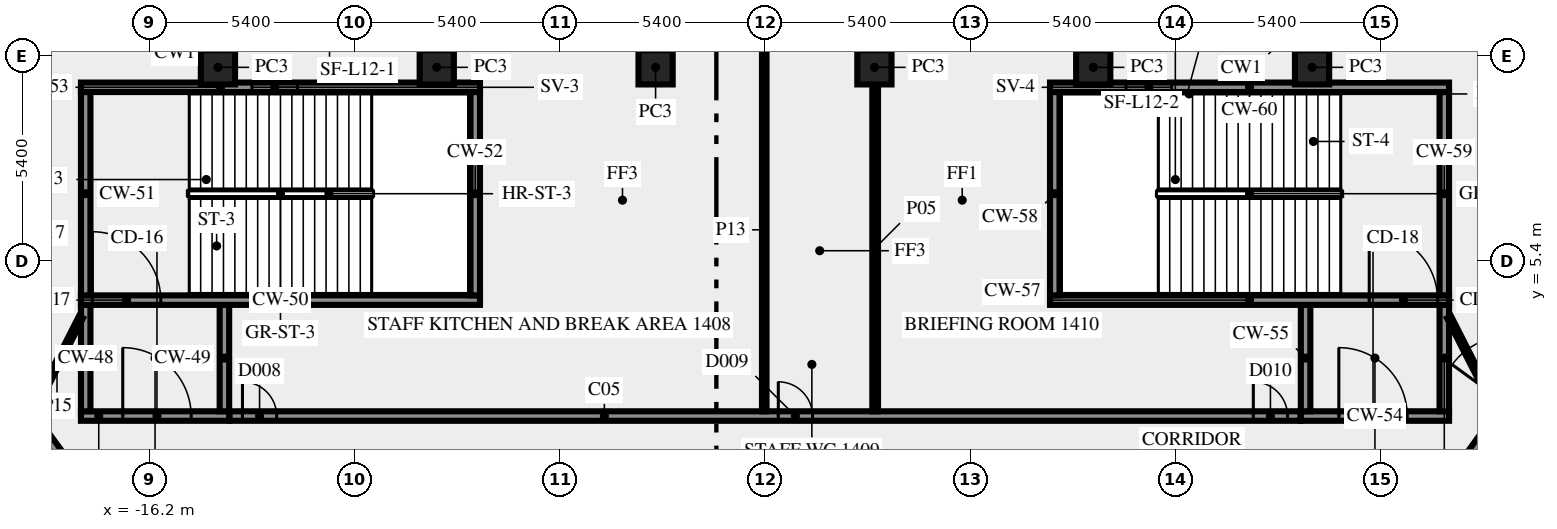
"""IFC4 building model, lengths in metres.
Left out: names, types, materials, properties, quantities, classifications, styles, units other than length and angle.
Written with IfcOpenShell. Run it as: python <this file> out.ifc"""

import sys

from ifc_helpers import new_model, si_unit, direction, frame, frame_2d, origin, origin_2d, place, context, subcontext, project, spatial, rectangle, extrude, element, fill, save


model = new_model("IFC4")
c1 = context("Model", 3, precision=1e-05, world=origin(), true_north=direction((0.0, 1.0)))
c2 = subcontext(c1, "Body", "Model", "MODEL_VIEW")
j1 = project(units=[si_unit("LENGTHUNIT", "METRE"), si_unit("PLANEANGLEUNIT", "RADIAN")], contexts=[c1])
p1 = place(None, origin())
s1 = spatial("IfcSite", under=j1, at=p1, CompositionType="ELEMENT")
p2 = place(p1, origin())
s2 = spatial("IfcBuilding", under=s1, at=p2, CompositionType="ELEMENT")
p3 = place(p2, frame((0.0, 0.0, 63.0)))
s3 = spatial("IfcBuildingStorey", under=s2, at=p3, CompositionType="ELEMENT", Elevation=63.0)
for number, where, z_axis, x_axis in (
    (1, (14.395, 10.5, 0.0), (0.0, 0.0, 1.0), (-1.0, 0.0, 0.0)),
    (2, (8.637, 10.5, 0.0), (0.0, 0.0, 1.0), (-1.0, 0.0, 0.0)),
    (3, (2.879, 10.5, 0.0), (0.0, 0.0, 1.0), (-1.0, 0.0, 0.0)),
    (4, (-2.879, 10.5, 0.0), (0.0, 0.0, 1.0), (-1.0, 0.0, 0.0)),
    (5, (-8.637, 10.5, 0.0), (0.0, 0.0, 1.0), (-1.0, 0.0, 0.0)),
    (6, (-14.395, 10.5, 0.0), (0.0, 0.0, 1.0), (-1.0, 0.0, 0.0)),
):
    element("IfcColumn", number, at=place(p3, frame(where, z_axis=z_axis, x_axis=x_axis)), inside=s3, PredefinedType="COLUMN", context=c2, shape_type="SweptSolid", body=[
        extrude(rectangle(XDim=0.9, YDim=0.9, at=origin_2d()), origin(), (0.0, 0.0, 1.0), 3.65),
    ])
p4 = place(p3, frame((-18.0, 1.325, 0.0), z_axis=(0.0, 0.0, 1.0), x_axis=(1.0, 0.0, 0.0)))
e7 = element("IfcWall", 7, at=p4, inside=s3, PredefinedType="SHEAR", context=c2, shape_type="SweptSolid", body=[
    extrude(rectangle(XDim=3.9, YDim=0.25, at=frame_2d((1.95, 0.0))), origin(), (0.0, 0.0, 1.0), 3.65),
])
p5 = place(p4, frame((1.1, 0.0, 0.0)))
e8 = element("IfcOpeningElement", 8, at=p5, cuts=e7, PredefinedType="OPENING", context=c2, shape_type="SweptSolid", body=[
    extrude(rectangle(XDim=1.8, YDim=2.1, at=frame_2d((0.9, 1.05))), frame((0.0, 0.135, 0.0), z_axis=(0.0, -1.0, 0.0), x_axis=(1.0, 0.0, 0.0)), (0.0, 0.0, 1.0), 0.27),
])
for number, where, z_axis, x_axis in (
    (9, (-17.875, 1.45, 0.0), (0.0, 0.0, 1.0), (0.0, 1.0, 0.0)),
    (10, (-14.225, 1.45, 0.0), (0.0, 0.0, 1.0), (0.0, 1.0, 0.0)),
):
    element("IfcWall", number, at=place(p3, frame(where, z_axis=z_axis, x_axis=x_axis)), inside=s3, PredefinedType="SHEAR", context=c2, shape_type="SweptSolid", body=[
        extrude(rectangle(XDim=2.8, YDim=0.25, at=frame_2d((1.4, 0.0))), origin(), (0.0, 0.0, 1.0), 3.65),
    ])
p6 = place(p3, frame((-18.0, 4.375, 0.0), z_axis=(0.0, 0.0, 1.0), x_axis=(1.0, 0.0, 0.0)))
e11 = element("IfcWall", 11, at=p6, inside=s3, PredefinedType="SHEAR", context=c2, shape_type="SweptSolid", body=[
    extrude(rectangle(XDim=10.5, YDim=0.25, at=frame_2d((5.25, 0.0))), origin(), (0.0, 0.0, 1.0), 3.65),
])
p7 = place(p6, frame((0.3, 0.0, 0.0)))
e12 = element("IfcOpeningElement", 12, at=p7, cuts=e11, PredefinedType="OPENING", context=c2, shape_type="SweptSolid", body=[
    extrude(rectangle(XDim=1.8, YDim=2.1, at=frame_2d((0.9, 1.05))), frame((0.0, 0.135, 0.0), z_axis=(0.0, -1.0, 0.0), x_axis=(1.0, 0.0, 0.0)), (0.0, 0.0, 1.0), 0.27),
])
for number, where, z_axis, x_axis in (
    (13, (-17.875, 4.5, 0.0), (0.0, 0.0, 1.0), (0.0, 1.0, 0.0)),
    (14, (-7.625, 4.5, 0.0), (0.0, 0.0, 1.0), (0.0, 1.0, 0.0)),
):
    element("IfcWall", number, at=place(p3, frame(where, z_axis=z_axis, x_axis=x_axis)), inside=s3, PredefinedType="SHEAR", context=c2, shape_type="SweptSolid", body=[
        extrude(rectangle(XDim=5.35, YDim=0.25, at=frame_2d((2.675, 0.0))), origin(), (0.0, 0.0, 1.0), 3.65),
    ])
p8 = place(p3, frame((-18.0, 9.975, 0.0), z_axis=(0.0, 0.0, 1.0), x_axis=(1.0, 0.0, 0.0)))
e15 = element("IfcWall", 15, at=p8, inside=s3, PredefinedType="SHEAR", context=c2, shape_type="SweptSolid", body=[
    extrude(rectangle(XDim=10.5, YDim=0.25, at=frame_2d((5.25, 0.0))), origin(), (0.0, 0.0, 1.0), 3.65),
])
p9 = place(p8, frame((4.5, 0.0, 1.0)))
e16 = element("IfcOpeningElement", 16, at=p9, cuts=e15, PredefinedType="OPENING", context=c2, shape_type="SweptSolid", body=[
    extrude(rectangle(XDim=1.2, YDim=1.2, at=frame_2d((0.6, 0.6))), frame((0.0, 0.135, 0.0), z_axis=(0.0, -1.0, 0.0), x_axis=(1.0, 0.0, 0.0)), (0.0, 0.0, 1.0), 0.27),
])
p10 = place(p3, frame((14.1, 1.325, 0.0), z_axis=(0.0, 0.0, 1.0), x_axis=(1.0, 0.0, 0.0)))
e17 = element("IfcWall", 17, at=p10, inside=s3, PredefinedType="SHEAR", context=c2, shape_type="SweptSolid", body=[
    extrude(rectangle(XDim=3.9, YDim=0.25, at=frame_2d((1.95, 0.0))), origin(), (0.0, 0.0, 1.0), 3.65),
])
p11 = place(p10, frame((1.0, 0.0, 0.0)))
e18 = element("IfcOpeningElement", 18, at=p11, cuts=e17, PredefinedType="OPENING", context=c2, shape_type="SweptSolid", body=[
    extrude(rectangle(XDim=1.8, YDim=2.1, at=frame_2d((0.9, 1.05))), frame((0.0, 0.135, 0.0), z_axis=(0.0, -1.0, 0.0), x_axis=(1.0, 0.0, 0.0)), (0.0, 0.0, 1.0), 0.27),
])
for number, where, z_axis, x_axis in (
    (19, (14.225, 1.45, 0.0), (0.0, 0.0, 1.0), (0.0, 1.0, 0.0)),
    (20, (17.875, 1.45, 0.0), (0.0, 0.0, 1.0), (0.0, 1.0, 0.0)),
):
    element("IfcWall", number, at=place(p3, frame(where, z_axis=z_axis, x_axis=x_axis)), inside=s3, PredefinedType="SHEAR", context=c2, shape_type="SweptSolid", body=[
        extrude(rectangle(XDim=2.8, YDim=0.25, at=frame_2d((1.4, 0.0))), origin(), (0.0, 0.0, 1.0), 3.65),
    ])
p12 = place(p3, frame((7.5, 4.375, 0.0), z_axis=(0.0, 0.0, 1.0), x_axis=(1.0, 0.0, 0.0)))
e21 = element("IfcWall", 21, at=p12, inside=s3, PredefinedType="SHEAR", context=c2, shape_type="SweptSolid", body=[
    extrude(rectangle(XDim=10.5, YDim=0.25, at=frame_2d((5.25, 0.0))), origin(), (0.0, 0.0, 1.0), 3.65),
])
p13 = place(p12, frame((8.4, 0.0, 0.0)))
e22 = element("IfcOpeningElement", 22, at=p13, cuts=e21, PredefinedType="OPENING", context=c2, shape_type="SweptSolid", body=[
    extrude(rectangle(XDim=1.8, YDim=2.1, at=frame_2d((0.9, 1.05))), frame((0.0, 0.135, 0.0), z_axis=(0.0, -1.0, 0.0), x_axis=(1.0, 0.0, 0.0)), (0.0, 0.0, 1.0), 0.27),
])
for number, where, z_axis, x_axis in (
    (23, (7.625, 4.5, 0.0), (0.0, 0.0, 1.0), (0.0, 1.0, 0.0)),
    (24, (17.875, 4.5, 0.0), (0.0, 0.0, 1.0), (0.0, 1.0, 0.0)),
):
    element("IfcWall", number, at=place(p3, frame(where, z_axis=z_axis, x_axis=x_axis)), inside=s3, PredefinedType="SHEAR", context=c2, shape_type="SweptSolid", body=[
        extrude(rectangle(XDim=5.35, YDim=0.25, at=frame_2d((2.675, 0.0))), origin(), (0.0, 0.0, 1.0), 3.65),
    ])
p14 = place(p3, frame((7.5, 9.975, 0.0), z_axis=(0.0, 0.0, 1.0), x_axis=(1.0, 0.0, 0.0)))
e25 = element("IfcWall", 25, at=p14, inside=s3, PredefinedType="SHEAR", context=c2, shape_type="SweptSolid", body=[
    extrude(rectangle(XDim=10.5, YDim=0.25, at=frame_2d((5.25, 0.0))), origin(), (0.0, 0.0, 1.0), 3.65),
])
p15 = place(p14, frame((2.0, 0.0, 1.0)))
e26 = element("IfcOpeningElement", 26, at=p15, cuts=e25, PredefinedType="OPENING", context=c2, shape_type="SweptSolid", body=[
    extrude(rectangle(XDim=1.2, YDim=1.2, at=frame_2d((0.6, 0.6))), frame((0.0, 0.135, 0.0), z_axis=(0.0, -1.0, 0.0), x_axis=(1.0, 0.0, 0.0)), (0.0, 0.0, 1.0), 0.27),
])
p16 = place(p3, frame((-37.232, 25.972, 0.0), z_axis=(0.0, 0.0, 1.0), x_axis=(0.587786323093, -0.809016216391, 0.0)))
e27 = element("IfcWall", 27, at=p16, inside=s3, PredefinedType="SOLIDWALL", context=c2, shape_type="SweptSolid", body=[
    extrude(rectangle(XDim=33.493, YDim=0.25, at=frame_2d((16.747, 0.0))), origin(), (0.0, 0.0, 1.0), 3.65),
])
p17 = place(p16, frame((28.301, 0.0, 0.0)))
e28 = element("IfcOpeningElement", 28, at=p17, cuts=e27, PredefinedType="OPENING", context=c2, shape_type="SweptSolid", body=[
    extrude(rectangle(XDim=1.8, YDim=2.1, at=frame_2d((0.9, 1.05))), frame((0.0, 0.135, 0.0), z_axis=(0.0, -1.0, 0.0), x_axis=(1.0, 0.0, 0.0)), (0.0, 0.0, 1.0), 0.27),
])
p18 = place(p16, frame((4.235, 0.0, 0.0)))
e29 = element("IfcOpeningElement", 29, at=p18, cuts=e27, PredefinedType="OPENING", context=c2, shape_type="SweptSolid", body=[
    extrude(rectangle(XDim=1.8, YDim=2.1, at=frame_2d((0.9, 1.05))), frame((0.0, 0.135, 0.0), z_axis=(0.0, -1.0, 0.0), x_axis=(1.0, 0.0, 0.0)), (0.0, 0.0, 1.0), 0.27),
])
p19 = place(p16, frame((2.685, 0.0, 0.0)))
e30 = element("IfcOpeningElement", 30, at=p19, cuts=e27, PredefinedType="OPENING", context=c2, shape_type="SweptSolid", body=[
    extrude(rectangle(XDim=0.9, YDim=2.1, at=frame_2d((0.45, 1.05))), frame((0.0, 0.135, 0.0), z_axis=(0.0, -1.0, 0.0), x_axis=(1.0, 0.0, 0.0)), (0.0, 0.0, 1.0), 0.27),
])
p20 = place(p3, frame((-14.09, 1.325, 0.0), z_axis=(0.0, 0.0, 1.0), x_axis=(1.0, 0.0, 0.0)))
e31 = element("IfcWall", 31, at=p20, inside=s3, PredefinedType="SOLIDWALL", context=c2, shape_type="SweptSolid", body=[
    extrude(rectangle(XDim=28.18, YDim=0.25, at=frame_2d((14.09, 0.0))), origin(), (0.0, 0.0, 1.0), 3.65),
])
p21 = place(p20, frame((26.94, 0.0, 0.0)))
e32 = element("IfcOpeningElement", 32, at=p21, cuts=e31, PredefinedType="OPENING", context=c2, shape_type="SweptSolid", body=[
    extrude(rectangle(XDim=0.9, YDim=2.1, at=frame_2d((0.45, 1.05))), frame((0.0, 0.135, 0.0), z_axis=(0.0, -1.0, 0.0), x_axis=(1.0, 0.0, 0.0)), (0.0, 0.0, 1.0), 0.27),
])
p22 = place(p20, frame((0.34, 0.0, 0.0)))
e33 = element("IfcOpeningElement", 33, at=p22, cuts=e31, PredefinedType="OPENING", context=c2, shape_type="SweptSolid", body=[
    extrude(rectangle(XDim=0.9, YDim=2.1, at=frame_2d((0.45, 1.05))), frame((0.0, 0.135, 0.0), z_axis=(0.0, -1.0, 0.0), x_axis=(1.0, 0.0, 0.0)), (0.0, 0.0, 1.0), 0.27),
])
p23 = place(p20, frame((14.44, 0.0, 0.0)))
e34 = element("IfcOpeningElement", 34, at=p23, cuts=e31, PredefinedType="OPENING", context=c2, shape_type="SweptSolid", body=[
    extrude(rectangle(XDim=0.9, YDim=2.1, at=frame_2d((0.45, 1.05))), frame((0.0, 0.135, 0.0), z_axis=(0.0, -1.0, 0.0), x_axis=(1.0, 0.0, 0.0)), (0.0, 0.0, 1.0), 0.27),
])
p24 = place(p3, frame((17.545, -1.125, 0.0), z_axis=(0.0, 0.0, 1.0), x_axis=(0.587786323093, 0.809016216391, 0.0)))
e35 = element("IfcWall", 35, at=p24, inside=s3, PredefinedType="SOLIDWALL", context=c2, shape_type="SweptSolid", body=[
    extrude(rectangle(XDim=33.493, YDim=0.25, at=frame_2d((16.747, 0.0))), origin(), (0.0, 0.0, 1.0), 3.65),
])
p25 = place(p24, frame((31.403, 0.0, 0.0)))
e36 = element("IfcOpeningElement", 36, at=p25, cuts=e35, PredefinedType="OPENING", context=c2, shape_type="SweptSolid", body=[
    extrude(rectangle(XDim=1.8, YDim=2.1, at=frame_2d((0.9, 1.05))), frame((0.0, 0.135, 0.0), z_axis=(0.0, -1.0, 0.0), x_axis=(1.0, 0.0, 0.0)), (0.0, 0.0, 1.0), 0.27),
])
p26 = place(p24, frame((3.392, 0.0, 0.0)))
e37 = element("IfcOpeningElement", 37, at=p26, cuts=e35, PredefinedType="OPENING", context=c2, shape_type="SweptSolid", body=[
    extrude(rectangle(XDim=1.8, YDim=2.1, at=frame_2d((0.9, 1.05))), frame((0.0, 0.135, 0.0), z_axis=(0.0, -1.0, 0.0), x_axis=(1.0, 0.0, 0.0)), (0.0, 0.0, 1.0), 0.27),
])
p27 = place(p3, frame((2.899, 10.045, 0.0), z_axis=(0.0, 0.0, 1.0), x_axis=(0.0, -1.0, 0.0)))
e38 = element("IfcWall", 38, at=p27, inside=s3, PredefinedType="PARTITIONING", context=c2, shape_type="SweptSolid", body=[
    extrude(rectangle(XDim=8.595, YDim=0.15, at=frame_2d((4.297, 0.0))), origin(), (0.0, 0.0, 1.0), 3.65),
])
p28 = place(p3, frame((-0.02, 1.45, 0.0), z_axis=(0.0, 0.0, 1.0), x_axis=(0.0, 1.0, 0.0)))
e39 = element("IfcWall", 39, at=p28, inside=s3, PredefinedType="PARTITIONING", context=c2, shape_type="SweptSolid", body=[
    extrude(rectangle(XDim=9.55, YDim=0.12, at=frame_2d((4.775, 0.0))), origin(), (0.0, 0.0, 1.0), 2.75),
])
for number, where, z_axis, x_axis in (
    (40, (18.0, 3.925, 0.0), (0.0, 0.0, 1.0), (0.454, -0.891, 0.0)),
    (41, (-19.261, 1.45, 0.0), (0.0, 0.0, 1.0), (0.454, 0.891, 0.0)),
):
    element("IfcWall", number, at=place(p3, frame(where, z_axis=z_axis, x_axis=x_axis)), inside=s3, PredefinedType="PARTITIONING", context=c2, shape_type="SweptSolid", body=[
        extrude(rectangle(XDim=2.778, YDim=0.12, at=frame_2d((1.389, 0.0))), origin(), (0.0, 0.0, 1.0), 3.65),
    ])
p29 = place(p5, origin())
e42 = element("IfcDoor", 42, at=p29, inside=s3, OperationType="DOUBLE_DOOR_SINGLE_SWING", PredefinedType="DOOR", context=c2, shape_type="SweptSolid", body=[
    extrude(rectangle(XDim=1.8, YDim=2.1, at=frame_2d((0.9, 1.05))), frame((0.0, 0.025, 0.0), z_axis=(0.0, -1.0, 0.0), x_axis=(1.0, 0.0, 0.0)), (0.0, 0.0, 1.0), 0.05),
])
fill(e8, e42)
p30 = place(p7, origin())
e43 = element("IfcDoor", 43, at=p30, inside=s3, OperationType="DOUBLE_DOOR_SINGLE_SWING", PredefinedType="DOOR", context=c2, shape_type="SweptSolid", body=[
    extrude(rectangle(XDim=1.8, YDim=2.1, at=frame_2d((0.9, 1.05))), frame((0.0, 0.025, 0.0), z_axis=(0.0, -1.0, 0.0), x_axis=(1.0, 0.0, 0.0)), (0.0, 0.0, 1.0), 0.05),
])
fill(e12, e43)
p31 = place(p9, origin())
e44 = element("IfcWindow", 44, at=p31, inside=s3, PartitioningType="SINGLE_PANEL", PredefinedType="WINDOW", context=c2, shape_type="SweptSolid", body=[
    extrude(rectangle(XDim=1.2, YDim=1.2, at=frame_2d((0.6, 0.6))), frame((0.0, 0.03, 0.0), z_axis=(0.0, -1.0, 0.0), x_axis=(1.0, 0.0, 0.0)), (0.0, 0.0, 1.0), 0.06),
])
fill(e16, e44)
p32 = place(p11, origin())
e45 = element("IfcDoor", 45, at=p32, inside=s3, OperationType="DOUBLE_DOOR_SINGLE_SWING", PredefinedType="DOOR", context=c2, shape_type="SweptSolid", body=[
    extrude(rectangle(XDim=1.8, YDim=2.1, at=frame_2d((0.9, 1.05))), frame((0.0, 0.025, 0.0), z_axis=(0.0, -1.0, 0.0), x_axis=(1.0, 0.0, 0.0)), (0.0, 0.0, 1.0), 0.05),
])
fill(e18, e45)
p33 = place(p13, origin())
e46 = element("IfcDoor", 46, at=p33, inside=s3, OperationType="DOUBLE_DOOR_SINGLE_SWING", PredefinedType="DOOR", context=c2, shape_type="SweptSolid", body=[
    extrude(rectangle(XDim=1.8, YDim=2.1, at=frame_2d((0.9, 1.05))), frame((0.0, 0.025, 0.0), z_axis=(0.0, -1.0, 0.0), x_axis=(1.0, 0.0, 0.0)), (0.0, 0.0, 1.0), 0.05),
])
fill(e22, e46)
p34 = place(p15, origin())
e47 = element("IfcWindow", 47, at=p34, inside=s3, PartitioningType="SINGLE_PANEL", PredefinedType="WINDOW", context=c2, shape_type="SweptSolid", body=[
    extrude(rectangle(XDim=1.2, YDim=1.2, at=frame_2d((0.6, 0.6))), frame((0.0, 0.03, 0.0), z_axis=(0.0, -1.0, 0.0), x_axis=(1.0, 0.0, 0.0)), (0.0, 0.0, 1.0), 0.06),
])
fill(e26, e47)
p35 = place(p21, origin())
e48 = element("IfcDoor", 48, at=p35, inside=s3, OperationType="SINGLE_SWING_RIGHT", PredefinedType="DOOR", context=c2, shape_type="SweptSolid", body=[
    extrude(rectangle(XDim=0.9, YDim=2.1, at=frame_2d((0.45, 1.05))), frame((0.0, 0.025, 0.0), z_axis=(0.0, -1.0, 0.0), x_axis=(1.0, 0.0, 0.0)), (0.0, 0.0, 1.0), 0.05),
])
fill(e32, e48)
p36 = place(p22, origin())
e49 = element("IfcDoor", 49, at=p36, inside=s3, OperationType="SINGLE_SWING_LEFT", PredefinedType="DOOR", context=c2, shape_type="SweptSolid", body=[
    extrude(rectangle(XDim=0.9, YDim=2.1, at=frame_2d((0.45, 1.05))), frame((0.0, 0.025, 0.0), z_axis=(0.0, -1.0, 0.0), x_axis=(1.0, 0.0, 0.0)), (0.0, 0.0, 1.0), 0.05),
])
fill(e33, e49)
p37 = place(p23, origin())
e50 = element("IfcDoor", 50, at=p37, inside=s3, OperationType="SINGLE_SWING_LEFT", PredefinedType="DOOR", context=c2, shape_type="SweptSolid", body=[
    extrude(rectangle(XDim=0.9, YDim=2.1, at=frame_2d((0.45, 1.05))), frame((0.0, 0.025, 0.0), z_axis=(0.0, -1.0, 0.0), x_axis=(1.0, 0.0, 0.0)), (0.0, 0.0, 1.0), 0.05),
])
fill(e34, e50)
save(model, sys.argv[1])
